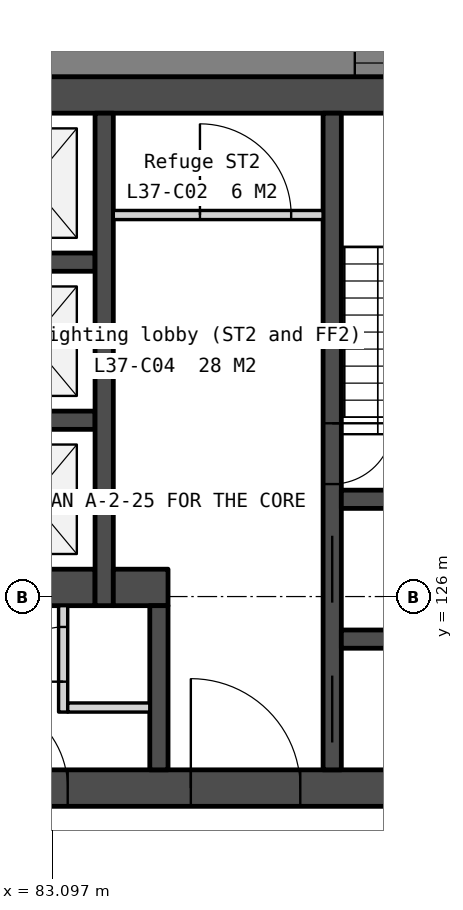
"""IFC4 building model, lengths in metres.
Left out: names, types, materials, properties, quantities, classifications, styles, units other than length and angle.
Written with IfcOpenShell. Run it as: python <this file> out.ifc"""

import sys

from ifc_helpers import new_model, si_unit, direction, frame, frame_2d, origin, place, context, subcontext, project, spatial, polyline, rectangle, outline, extrude, element, fill, save


model = new_model("IFC4")
c1 = context("Model", 3, precision=1e-05, world=origin(), true_north=direction((0.0, 1.0)))
c2 = subcontext(c1, "Body", "Model", "MODEL_VIEW")
j1 = project(units=[si_unit("LENGTHUNIT", "METRE"), si_unit("PLANEANGLEUNIT", "RADIAN")], contexts=[c1])
p1 = place(None, origin())
s1 = spatial("IfcSite", under=j1, at=p1, CompositionType="ELEMENT")
p2 = place(p1, origin())
s2 = spatial("IfcBuilding", under=s1, at=p2, CompositionType="ELEMENT")
p3 = place(p2, frame((0.0, 0.0, 148.1)))
s3 = spatial("IfcBuildingStorey", under=s2, at=p3, CompositionType="ELEMENT", Elevation=148.1)
p4 = place(p3, frame((69.0, 134.25, 0.0), z_axis=(0.0, 0.0, 1.0), x_axis=(1.0, 0.0, 0.0)))
e1 = element("IfcWall", 1, at=p4, inside=s3, PredefinedType="SOLIDWALL", context=c2, shape_type="SweptSolid", body=[
    extrude(rectangle(XDim=22.0, YDim=0.6, at=frame_2d((11.0, 0.0))), origin(), (0.0, 0.0, 1.0), 3.75),
])
p5 = place(p3, frame((69.0, 122.85, 0.0), z_axis=(0.0, 0.0, 1.0), x_axis=(1.0, 0.0, 0.0)))
e2 = element("IfcWall", 2, at=p5, inside=s3, PredefinedType="SOLIDWALL", context=c2, shape_type="SweptSolid", body=[
    extrude(rectangle(XDim=22.0, YDim=0.6, at=frame_2d((11.0, 0.0))), origin(), (0.0, 0.0, 1.0), 3.75),
])
p6 = place(p5, frame((16.375, 0.0, 0.0)))
e3 = element("IfcOpeningElement", 3, at=p6, cuts=e2, PredefinedType="OPENING", context=c2, shape_type="SweptSolid", body=[
    extrude(rectangle(XDim=1.8, YDim=2.1, at=frame_2d((0.9, 1.05))), frame((0.0, 0.31, 0.0), z_axis=(0.0, -1.0, 0.0), x_axis=(1.0, 0.0, 0.0)), (0.0, 0.0, 1.0), 0.62),
])
p7 = place(p5, frame((3.825, 0.0, 0.0)))
e4 = element("IfcOpeningElement", 4, at=p7, cuts=e2, PredefinedType="OPENING", context=c2, shape_type="SweptSolid", body=[
    extrude(rectangle(XDim=1.8, YDim=2.1, at=frame_2d((0.9, 1.05))), frame((0.0, 0.31, 0.0), z_axis=(0.0, -1.0, 0.0), x_axis=(1.0, 0.0, 0.0)), (0.0, 0.0, 1.0), 0.62),
])
p8 = place(p5, frame((12.85, 0.0, 0.0)))
e5 = element("IfcOpeningElement", 5, at=p8, cuts=e2, PredefinedType="OPENING", context=c2, shape_type="SweptSolid", body=[
    extrude(rectangle(XDim=1.5, YDim=2.1, at=frame_2d((0.75, 1.05))), frame((0.0, 0.31, 0.0), z_axis=(0.0, -1.0, 0.0), x_axis=(1.0, 0.0, 0.0)), (0.0, 0.0, 1.0), 0.62),
])
for number, where, z_axis, x_axis in (
    (6, (81.7, 131.5, 0.0), (0.0, 0.0, 1.0), (1.0, 0.0, 0.0)),
    (7, (81.7, 128.9, 0.0), (0.0, 0.0, 1.0), (1.0, 0.0, 0.0)),
):
    element("IfcWall", number, at=place(p3, frame(where, z_axis=z_axis, x_axis=x_axis)), inside=s3, PredefinedType="SOLIDWALL", context=c2, shape_type="SweptSolid", body=[
        extrude(rectangle(XDim=2.1, YDim=0.3, at=frame_2d((1.05, 0.0))), origin(), (0.0, 0.0, 1.0), 3.75),
    ])
p9 = place(p3, frame((82.9, 126.15, 0.0), z_axis=(0.0, 0.0, 1.0), x_axis=(1.0, 0.0, 0.0)))
e8 = element("IfcWall", 8, at=p9, inside=s3, PredefinedType="SOLIDWALL", context=c2, shape_type="SweptSolid", body=[
    extrude(rectangle(XDim=0.9, YDim=0.6, at=frame_2d((0.45, 0.0))), origin(), (0.0, 0.0, 1.0), 3.75),
])
p10 = place(p3, frame((83.275, 125.85, 0.0), z_axis=(0.0, 0.0, 1.0), x_axis=(0.0, -1.0, 0.0)))
e9 = element("IfcWall", 9, at=p10, inside=s3, PredefinedType="PARTITIONING", context=c2, shape_type="SweptSolid", body=[
    extrude(rectangle(XDim=1.75, YDim=0.15, at=frame_2d((0.875, 0.0))), origin(), (0.0, 0.0, 1.0), 3.75),
])
p11 = place(p10, frame((0.35, 0.0, 0.0)))
e10 = element("IfcOpeningElement", 10, at=p11, cuts=e9, PredefinedType="OPENING", context=c2, shape_type="SweptSolid", body=[
    extrude(rectangle(XDim=0.9, YDim=2.1, at=frame_2d((0.45, 1.05))), frame((0.0, 0.085, 0.0), z_axis=(0.0, -1.0, 0.0), x_axis=(1.0, 0.0, 0.0)), (0.0, 0.0, 1.0), 0.17),
])
p12 = place(p3, frame((83.35, 124.175, 0.0), z_axis=(0.0, 0.0, 1.0), x_axis=(1.0, 0.0, 0.0)))
e11 = element("IfcWall", 11, at=p12, inside=s3, PredefinedType="PARTITIONING", context=c2, shape_type="SweptSolid", body=[
    extrude(rectangle(XDim=1.35, YDim=0.15, at=frame_2d((0.675, 0.0))), origin(), (0.0, 0.0, 1.0), 3.75),
])
p13 = place(p3, frame((83.95, 133.95, 0.0), z_axis=(0.0, 0.0, 1.0), x_axis=(0.0, -1.0, 0.0)))
e12 = element("IfcWall", 12, at=p13, inside=s3, PredefinedType="SOLIDWALL", context=c2, shape_type="SweptSolid", body=[
    extrude(rectangle(XDim=8.1, YDim=0.3, at=frame_2d((4.05, 0.0))), origin(), (0.0, 0.0, 1.0), 3.75),
])
p14 = place(p3, frame((84.1, 132.275, 0.0), z_axis=(0.0, 0.0, 1.0), x_axis=(1.0, 0.0, 0.0)))
e13 = element("IfcWall", 13, at=p14, inside=s3, PredefinedType="PARTITIONING", context=c2, shape_type="SweptSolid", body=[
    extrude(rectangle(XDim=3.45, YDim=0.15, at=frame_2d((1.725, 0.0))), origin(), (0.0, 0.0, 1.0), 3.75),
])
p15 = place(p14, frame((1.425, 0.0, 0.0)))
e14 = element("IfcOpeningElement", 14, at=p15, cuts=e13, PredefinedType="OPENING", context=c2, shape_type="SweptSolid", body=[
    extrude(rectangle(XDim=1.5, YDim=2.1, at=frame_2d((0.75, 1.05))), frame((0.0, 0.085, 0.0), z_axis=(0.0, -1.0, 0.0), x_axis=(1.0, 0.0, 0.0)), (0.0, 0.0, 1.0), 0.17),
])
p16 = place(p3, frame((84.1, 126.15, 0.0), z_axis=(0.0, 0.0, 1.0), x_axis=(1.0, 0.0, 0.0)))
e15 = element("IfcWall", 15, at=p16, inside=s3, PredefinedType="SOLIDWALL", context=c2, shape_type="SweptSolid", body=[
    extrude(rectangle(XDim=0.9, YDim=0.6, at=frame_2d((0.45, 0.0))), origin(), (0.0, 0.0, 1.0), 3.75),
])
p17 = place(p3, frame((84.85, 125.85, 0.0), z_axis=(0.0, 0.0, 1.0), x_axis=(0.0, -1.0, 0.0)))
e16 = element("IfcWall", 16, at=p17, inside=s3, PredefinedType="SOLIDWALL", context=c2, shape_type="SweptSolid", body=[
    extrude(rectangle(XDim=2.7, YDim=0.3, at=frame_2d((1.35, 0.0))), origin(), (0.0, 0.0, 1.0), 3.75),
])
p18 = place(p3, frame((87.7, 133.95, 0.0), z_axis=(0.0, 0.0, 1.0), x_axis=(0.0, -1.0, 0.0)))
e17 = element("IfcWall", 17, at=p18, inside=s3, PredefinedType="SOLIDWALL", context=c2, shape_type="SweptSolid", body=[
    extrude(rectangle(XDim=10.8, YDim=0.3, at=frame_2d((5.4, 0.0))), origin(), (0.0, 0.0, 1.0), 3.75),
])
p19 = place(p18, frame((6.95, 0.0, 0.0)))
e18 = element("IfcOpeningElement", 18, at=p19, cuts=e17, PredefinedType="OPENING", context=c2, shape_type="SweptSolid", body=[
    extrude(rectangle(XDim=1.1, YDim=2.1, at=frame_2d((0.55, 1.05))), frame((0.0, 0.16, 0.0), z_axis=(0.0, -1.0, 0.0), x_axis=(1.0, 0.0, 0.0)), (0.0, 0.0, 1.0), 0.32),
])
p20 = place(p18, frame((5.1, 0.0, 0.0)))
e19 = element("IfcOpeningElement", 19, at=p20, cuts=e17, PredefinedType="OPENING", context=c2, shape_type="SweptSolid", body=[
    extrude(rectangle(XDim=1.0, YDim=2.1, at=frame_2d((0.5, 1.05))), frame((0.0, 0.16, 0.0), z_axis=(0.0, -1.0, 0.0), x_axis=(1.0, 0.0, 0.0)), (0.0, 0.0, 1.0), 0.32),
])
p21 = place(p18, frame((9.25, 0.0, 0.0)))
e20 = element("IfcOpeningElement", 20, at=p21, cuts=e17, PredefinedType="OPENING", context=c2, shape_type="SweptSolid", body=[
    extrude(rectangle(XDim=1.1, YDim=2.1, at=frame_2d((0.55, 1.05))), frame((0.0, 0.16, 0.0), z_axis=(0.0, -1.0, 0.0), x_axis=(1.0, 0.0, 0.0)), (0.0, 0.0, 1.0), 0.32),
])
for number, where, z_axis, x_axis in (
    (21, (87.85, 127.6, 0.0), (0.0, 0.0, 1.0), (1.0, 0.0, 0.0)),
    (22, (87.85, 125.3, 0.0), (0.0, 0.0, 1.0), (1.0, 0.0, 0.0)),
):
    element("IfcWall", number, at=place(p3, frame(where, z_axis=z_axis, x_axis=x_axis)), inside=s3, PredefinedType="SOLIDWALL", context=c2, shape_type="SweptSolid", body=[
        extrude(rectangle(XDim=2.55, YDim=0.3, at=frame_2d((1.275, 0.0))), origin(), (0.0, 0.0, 1.0), 3.75),
    ])
p22 = place(p3, frame((100.243, 134.775, -0.15), z_axis=(0.0, 0.0, 1.0), x_axis=(-1.0, 0.0, 0.0)))
e23 = element("IfcWall", 23, at=p22, inside=s3, PredefinedType="SOLIDWALL", context=c2, shape_type="SweptSolid", body=[
    extrude(outline(polyline([(40.486, 0.0), (40.486, 3.9), (0.0, 3.9), (0.0, 0.0), (40.486, 0.0)])), frame((0.0, 0.225, 0.0), z_axis=(0.0, -1.0, 0.0), x_axis=(1.0, 0.0, 0.0)), (0.0, 0.0, 1.0), 0.45),
])
p23 = place(p22, frame((0.837, 0.0, 0.95)))
e24 = element("IfcOpeningElement", 24, at=p23, cuts=e23, PredefinedType="OPENING", context=c2, shape_type="SweptSolid", body=[
    extrude(rectangle(XDim=1.2, YDim=2.2, at=frame_2d((0.6, 1.1))), frame((0.0, 0.235, 0.0), z_axis=(0.0, -1.0, 0.0), x_axis=(1.0, 0.0, 0.0)), (0.0, 0.0, 1.0), 0.47),
])
p24 = place(p22, frame((8.072, 0.0, 0.95)))
e25 = element("IfcOpeningElement", 25, at=p24, cuts=e23, PredefinedType="OPENING", context=c2, shape_type="SweptSolid", body=[
    extrude(rectangle(XDim=1.8, YDim=2.2, at=frame_2d((0.9, 1.1))), frame((0.0, 0.235, 0.0), z_axis=(0.0, -1.0, 0.0), x_axis=(1.0, 0.0, 0.0)), (0.0, 0.0, 1.0), 0.47),
])
p25 = place(p22, frame((10.372, 0.0, 0.95)))
e26 = element("IfcOpeningElement", 26, at=p25, cuts=e23, PredefinedType="OPENING", context=c2, shape_type="SweptSolid", body=[
    extrude(rectangle(XDim=1.8, YDim=2.2, at=frame_2d((0.9, 1.1))), frame((0.0, 0.235, 0.0), z_axis=(0.0, -1.0, 0.0), x_axis=(1.0, 0.0, 0.0)), (0.0, 0.0, 1.0), 0.47),
])
p26 = place(p22, frame((18.193, 0.0, 0.95)))
e27 = element("IfcOpeningElement", 27, at=p26, cuts=e23, PredefinedType="OPENING", context=c2, shape_type="SweptSolid", body=[
    extrude(rectangle(XDim=1.8, YDim=2.2, at=frame_2d((0.9, 1.1))), frame((0.0, 0.235, 0.0), z_axis=(0.0, -1.0, 0.0), x_axis=(1.0, 0.0, 0.0)), (0.0, 0.0, 1.0), 0.47),
])
p27 = place(p22, frame((20.493, 0.0, 0.95)))
e28 = element("IfcOpeningElement", 28, at=p27, cuts=e23, PredefinedType="OPENING", context=c2, shape_type="SweptSolid", body=[
    extrude(rectangle(XDim=1.8, YDim=2.2, at=frame_2d((0.9, 1.1))), frame((0.0, 0.235, 0.0), z_axis=(0.0, -1.0, 0.0), x_axis=(1.0, 0.0, 0.0)), (0.0, 0.0, 1.0), 0.47),
])
p28 = place(p22, frame((28.315, 0.0, 0.95)))
e29 = element("IfcOpeningElement", 29, at=p28, cuts=e23, PredefinedType="OPENING", context=c2, shape_type="SweptSolid", body=[
    extrude(rectangle(XDim=1.8, YDim=2.2, at=frame_2d((0.9, 1.1))), frame((0.0, 0.235, 0.0), z_axis=(0.0, -1.0, 0.0), x_axis=(1.0, 0.0, 0.0)), (0.0, 0.0, 1.0), 0.47),
])
p29 = place(p22, frame((30.615, 0.0, 0.95)))
e30 = element("IfcOpeningElement", 30, at=p29, cuts=e23, PredefinedType="OPENING", context=c2, shape_type="SweptSolid", body=[
    extrude(rectangle(XDim=1.8, YDim=2.2, at=frame_2d((0.9, 1.1))), frame((0.0, 0.235, 0.0), z_axis=(0.0, -1.0, 0.0), x_axis=(1.0, 0.0, 0.0)), (0.0, 0.0, 1.0), 0.47),
])
p30 = place(p22, frame((38.449, 0.0, 0.95)))
e31 = element("IfcOpeningElement", 31, at=p30, cuts=e23, PredefinedType="OPENING", context=c2, shape_type="SweptSolid", body=[
    extrude(rectangle(XDim=1.2, YDim=2.2, at=frame_2d((0.6, 1.1))), frame((0.0, 0.235, 0.0), z_axis=(0.0, -1.0, 0.0), x_axis=(1.0, 0.0, 0.0)), (0.0, 0.0, 1.0), 0.47),
])
p31 = place(p3, frame((82.105, 96.067, -0.15), z_axis=(0.0, 0.0, 1.0), x_axis=(0.499997369791, 0.866026922331, 0.0)))
e32 = element("IfcWall", 32, at=p31, inside=s3, PredefinedType="SOLIDWALL", context=c2, shape_type="SweptSolid", body=[
    extrude(outline(polyline([(40.486, 0.0), (40.486, 3.9), (0.0, 3.9), (0.0, 0.0), (40.486, 0.0)])), frame((0.0, 0.225, 0.0), z_axis=(0.0, -1.0, 0.0), x_axis=(1.0, 0.0, 0.0)), (0.0, 0.0, 1.0), 0.45),
])
p32 = place(p31, frame((0.837, 0.0, 0.95)))
e33 = element("IfcOpeningElement", 33, at=p32, cuts=e32, PredefinedType="OPENING", context=c2, shape_type="SweptSolid", body=[
    extrude(rectangle(XDim=1.2, YDim=2.2, at=frame_2d((0.6, 1.1))), frame((0.0, 0.235, 0.0), z_axis=(0.0, -1.0, 0.0), x_axis=(1.0, 0.0, 0.0)), (0.0, 0.0, 1.0), 0.47),
])
p33 = place(p31, frame((8.072, 0.0, 0.95)))
e34 = element("IfcOpeningElement", 34, at=p33, cuts=e32, PredefinedType="OPENING", context=c2, shape_type="SweptSolid", body=[
    extrude(rectangle(XDim=1.8, YDim=2.2, at=frame_2d((0.9, 1.1))), frame((0.0, 0.235, 0.0), z_axis=(0.0, -1.0, 0.0), x_axis=(1.0, 0.0, 0.0)), (0.0, 0.0, 1.0), 0.47),
])
p34 = place(p31, frame((10.372, 0.0, 0.95)))
e35 = element("IfcOpeningElement", 35, at=p34, cuts=e32, PredefinedType="OPENING", context=c2, shape_type="SweptSolid", body=[
    extrude(rectangle(XDim=1.8, YDim=2.2, at=frame_2d((0.9, 1.1))), frame((0.0, 0.235, 0.0), z_axis=(0.0, -1.0, 0.0), x_axis=(1.0, 0.0, 0.0)), (0.0, 0.0, 1.0), 0.47),
])
p35 = place(p31, frame((18.193, 0.0, 0.95)))
e36 = element("IfcOpeningElement", 36, at=p35, cuts=e32, PredefinedType="OPENING", context=c2, shape_type="SweptSolid", body=[
    extrude(rectangle(XDim=1.8, YDim=2.2, at=frame_2d((0.9, 1.1))), frame((0.0, 0.235, 0.0), z_axis=(0.0, -1.0, 0.0), x_axis=(1.0, 0.0, 0.0)), (0.0, 0.0, 1.0), 0.47),
])
p36 = place(p31, frame((20.493, 0.0, 0.95)))
e37 = element("IfcOpeningElement", 37, at=p36, cuts=e32, PredefinedType="OPENING", context=c2, shape_type="SweptSolid", body=[
    extrude(rectangle(XDim=1.8, YDim=2.2, at=frame_2d((0.9, 1.1))), frame((0.0, 0.235, 0.0), z_axis=(0.0, -1.0, 0.0), x_axis=(1.0, 0.0, 0.0)), (0.0, 0.0, 1.0), 0.47),
])
p37 = place(p31, frame((28.315, 0.0, 0.95)))
e38 = element("IfcOpeningElement", 38, at=p37, cuts=e32, PredefinedType="OPENING", context=c2, shape_type="SweptSolid", body=[
    extrude(rectangle(XDim=1.8, YDim=2.2, at=frame_2d((0.9, 1.1))), frame((0.0, 0.235, 0.0), z_axis=(0.0, -1.0, 0.0), x_axis=(1.0, 0.0, 0.0)), (0.0, 0.0, 1.0), 0.47),
])
p38 = place(p31, frame((30.615, 0.0, 0.95)))
e39 = element("IfcOpeningElement", 39, at=p38, cuts=e32, PredefinedType="OPENING", context=c2, shape_type="SweptSolid", body=[
    extrude(rectangle(XDim=1.8, YDim=2.2, at=frame_2d((0.9, 1.1))), frame((0.0, 0.235, 0.0), z_axis=(0.0, -1.0, 0.0), x_axis=(1.0, 0.0, 0.0)), (0.0, 0.0, 1.0), 0.47),
])
p39 = place(p31, frame((38.449, 0.0, 0.95)))
e40 = element("IfcOpeningElement", 40, at=p39, cuts=e32, PredefinedType="OPENING", context=c2, shape_type="SweptSolid", body=[
    extrude(rectangle(XDim=1.2, YDim=2.2, at=frame_2d((0.6, 1.1))), frame((0.0, 0.235, 0.0), z_axis=(0.0, -1.0, 0.0), x_axis=(1.0, 0.0, 0.0)), (0.0, 0.0, 1.0), 0.47),
])
p40 = place(p19, origin())
e41 = element("IfcDoor", 41, at=p40, inside=s3, OperationType="SLIDING_TO_LEFT", PredefinedType="DOOR", context=c2, shape_type="SweptSolid", body=[
    extrude(rectangle(XDim=1.1, YDim=2.1, at=frame_2d((0.55, 1.05))), frame((0.0, 0.025, 0.0), z_axis=(0.0, -1.0, 0.0), x_axis=(1.0, 0.0, 0.0)), (0.0, 0.0, 1.0), 0.05),
])
fill(e18, e41)
p41 = place(p6, origin())
e42 = element("IfcDoor", 42, at=p41, inside=s3, OperationType="DOUBLE_DOOR_DOUBLE_SWING", PredefinedType="DOOR", context=c2, shape_type="SweptSolid", body=[
    extrude(rectangle(XDim=1.8, YDim=2.1, at=frame_2d((0.9, 1.05))), frame((0.0, 0.025, 0.0), z_axis=(0.0, -1.0, 0.0), x_axis=(1.0, 0.0, 0.0)), (0.0, 0.0, 1.0), 0.05),
])
fill(e3, e42)
p42 = place(p8, origin())
e43 = element("IfcDoor", 43, at=p42, inside=s3, OperationType="DOUBLE_DOOR_DOUBLE_SWING", PredefinedType="DOOR", context=c2, shape_type="SweptSolid", body=[
    extrude(rectangle(XDim=1.5, YDim=2.1, at=frame_2d((0.75, 1.05))), frame((0.0, 0.025, 0.0), z_axis=(0.0, -1.0, 0.0), x_axis=(1.0, 0.0, 0.0)), (0.0, 0.0, 1.0), 0.05),
])
fill(e5, e43)
p43 = place(p11, origin())
e44 = element("IfcDoor", 44, at=p43, inside=s3, OperationType="SINGLE_SWING_RIGHT", PredefinedType="DOOR", context=c2, shape_type="SweptSolid", body=[
    extrude(rectangle(XDim=0.9, YDim=2.1, at=frame_2d((0.45, 1.05))), frame((0.0, 0.025, 0.0), z_axis=(0.0, -1.0, 0.0), x_axis=(1.0, 0.0, 0.0)), (0.0, 0.0, 1.0), 0.05),
])
fill(e10, e44)
p44 = place(p15, origin())
e45 = element("IfcDoor", 45, at=p44, inside=s3, OperationType="DOUBLE_DOOR_DOUBLE_SWING", PredefinedType="DOOR", context=c2, shape_type="SweptSolid", body=[
    extrude(rectangle(XDim=1.5, YDim=2.1, at=frame_2d((0.75, 1.05))), frame((0.0, 0.025, 0.0), z_axis=(0.0, -1.0, 0.0), x_axis=(1.0, 0.0, 0.0)), (0.0, 0.0, 1.0), 0.05),
])
fill(e14, e45)
p45 = place(p20, origin())
e46 = element("IfcDoor", 46, at=p45, inside=s3, OperationType="SINGLE_SWING_LEFT", PredefinedType="DOOR", context=c2, shape_type="SweptSolid", body=[
    extrude(rectangle(XDim=1.0, YDim=2.1, at=frame_2d((0.5, 1.05))), frame((0.0, 0.025, 0.0), z_axis=(0.0, -1.0, 0.0), x_axis=(1.0, 0.0, 0.0)), (0.0, 0.0, 1.0), 0.05),
])
fill(e19, e46)
p46 = place(p21, origin())
e47 = element("IfcDoor", 47, at=p46, inside=s3, OperationType="SLIDING_TO_LEFT", PredefinedType="DOOR", context=c2, shape_type="SweptSolid", body=[
    extrude(rectangle(XDim=1.1, YDim=2.1, at=frame_2d((0.55, 1.05))), frame((0.0, 0.025, 0.0), z_axis=(0.0, -1.0, 0.0), x_axis=(1.0, 0.0, 0.0)), (0.0, 0.0, 1.0), 0.05),
])
fill(e20, e47)
p47 = place(p25, origin())
e48 = element("IfcWindow", 48, at=p47, inside=s3, PartitioningType="SINGLE_PANEL", PredefinedType="WINDOW", context=c2, shape_type="SweptSolid", body=[
    extrude(rectangle(XDim=1.8, YDim=2.2, at=frame_2d((0.9, 1.1))), frame((0.0, 0.03, 0.0), z_axis=(0.0, -1.0, 0.0), x_axis=(1.0, 0.0, 0.0)), (0.0, 0.0, 1.0), 0.06),
])
fill(e26, e48)
save(model, sys.argv[1])
